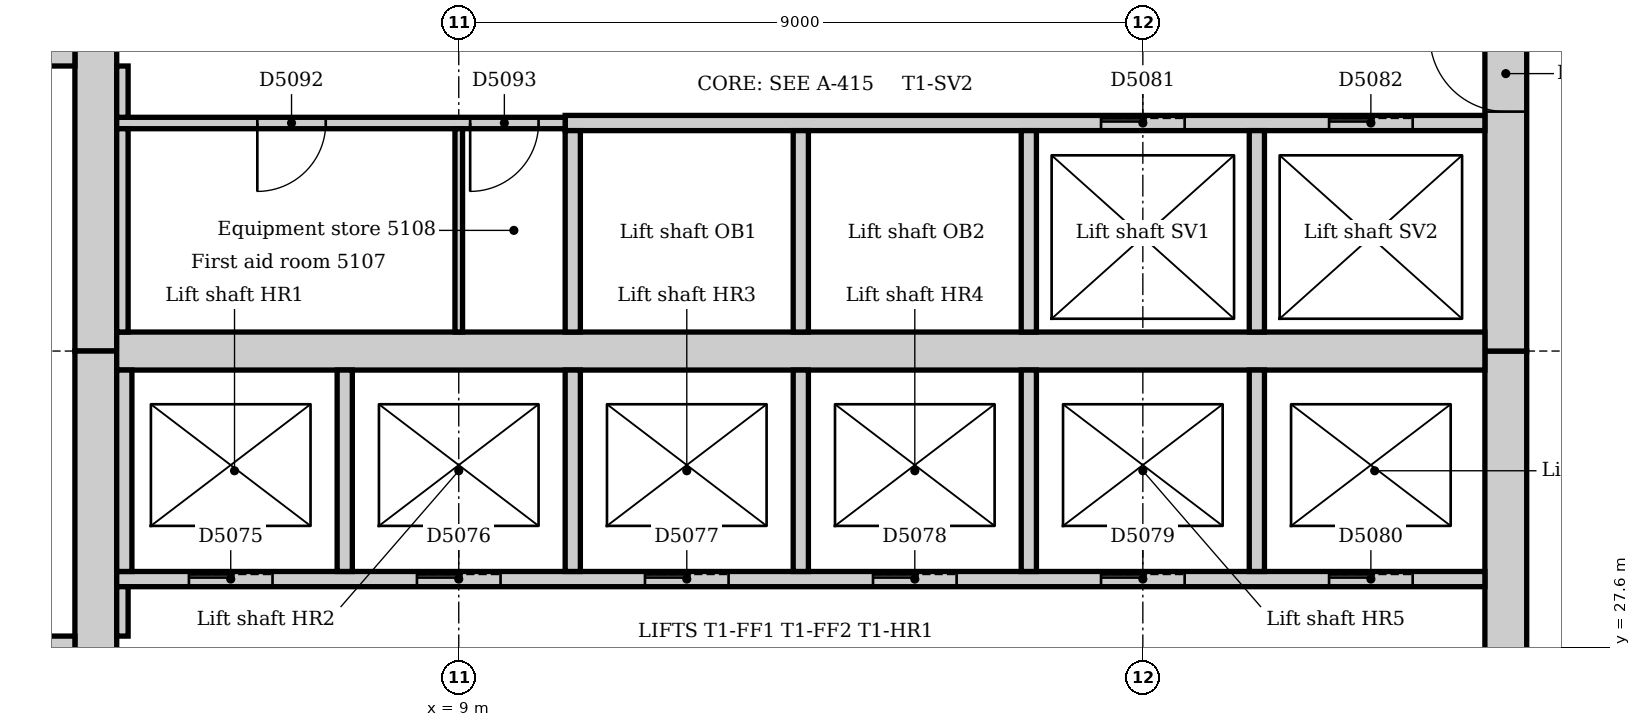
"""IFC4 building model, lengths in metres.
Left out: names, types, materials, properties, quantities, classifications, styles, units other than length and angle.
Written with IfcOpenShell. Run it as: python <this file> out.ifc"""

import sys

from ifc_helpers import new_model, si_unit, direction, frame, frame_2d, origin, place, context, subcontext, project, spatial, rectangle, extrude, element, fill, save


model = new_model("IFC4")
c1 = context("Model", 3, precision=1e-05, world=origin(), true_north=direction((0.0, 1.0)))
c2 = subcontext(c1, "Body", "Model", "MODEL_VIEW")
j1 = project(units=[si_unit("LENGTHUNIT", "METRE"), si_unit("PLANEANGLEUNIT", "RADIAN")], contexts=[c1])
p1 = place(None, origin())
s1 = spatial("IfcSite", under=j1, at=p1, CompositionType="ELEMENT")
p2 = place(p1, origin())
s2 = spatial("IfcBuilding", under=s1, at=p2, CompositionType="ELEMENT")
p3 = place(p2, frame((0.0, 0.0, 214.0)))
s3 = spatial("IfcBuildingStorey", under=s2, at=p3, CompositionType="ELEMENT", Elevation=214.0)
p4 = place(p3, frame((22.775, 21.0, 0.0), z_axis=(0.0, 0.0, 1.0), x_axis=(0.0, 1.0, 0.0)))
e1 = element("IfcWall", 1, at=p4, inside=s3, PredefinedType="SOLIDWALL", context=c2, shape_type="SweptSolid", body=[
    extrude(rectangle(XDim=10.5, YDim=0.55, at=frame_2d((5.25, 0.0))), origin(), (0.0, 0.0, 1.0), 4.0),
])
p5 = place(p4, frame((4.35, 0.0, 0.0)))
e2 = element("IfcOpeningElement", 2, at=p5, cuts=e1, PredefinedType="OPENING", context=c2, shape_type="SweptSolid", body=[
    extrude(rectangle(XDim=1.8, YDim=2.1, at=frame_2d((0.9, 1.05))), frame((0.0, 0.285, 0.0), z_axis=(0.0, -1.0, 0.0), x_axis=(1.0, 0.0, 0.0)), (0.0, 0.0, 1.0), 0.57),
])
p6 = place(p3, frame((22.775, 31.5, 0.0), z_axis=(0.0, 0.0, 1.0), x_axis=(0.0, 1.0, 0.0)))
e3 = element("IfcWall", 3, at=p6, inside=s3, PredefinedType="SOLIDWALL", context=c2, shape_type="SweptSolid", body=[
    extrude(rectangle(XDim=10.5, YDim=0.55, at=frame_2d((5.25, 0.0))), origin(), (0.0, 0.0, 1.0), 4.0),
])
p7 = place(p6, frame((3.15, 0.0, 0.0)))
e4 = element("IfcOpeningElement", 4, at=p7, cuts=e3, PredefinedType="OPENING", context=c2, shape_type="SweptSolid", body=[
    extrude(rectangle(XDim=1.0, YDim=2.1, at=frame_2d((0.5, 1.05))), frame((0.0, 0.285, 0.0), z_axis=(0.0, -1.0, 0.0), x_axis=(1.0, 0.0, 0.0)), (0.0, 0.0, 1.0), 0.57),
])
p8 = place(p6, frame((5.2, 0.0, 0.0)))
e5 = element("IfcOpeningElement", 5, at=p8, cuts=e3, PredefinedType="OPENING", context=c2, shape_type="SweptSolid", body=[
    extrude(rectangle(XDim=1.0, YDim=2.1, at=frame_2d((0.5, 1.05))), frame((0.0, 0.285, 0.0), z_axis=(0.0, -1.0, 0.0), x_axis=(1.0, 0.0, 0.0)), (0.0, 0.0, 1.0), 0.57),
])
p9 = place(p3, frame((4.225, 42.0, 0.0), z_axis=(0.0, 0.0, 1.0), x_axis=(0.0, -1.0, 0.0)))
e6 = element("IfcWall", 6, at=p9, inside=s3, PredefinedType="SOLIDWALL", context=c2, shape_type="SweptSolid", body=[
    extrude(rectangle(XDim=10.5, YDim=0.55, at=frame_2d((5.25, 0.0))), origin(), (0.0, 0.0, 1.0), 4.0),
])
p10 = place(p9, frame((5.3, 0.0, 0.0)))
e7 = element("IfcOpeningElement", 7, at=p10, cuts=e6, PredefinedType="OPENING", context=c2, shape_type="SweptSolid", body=[
    extrude(rectangle(XDim=1.0, YDim=2.1, at=frame_2d((0.5, 1.05))), frame((0.0, 0.285, 0.0), z_axis=(0.0, -1.0, 0.0), x_axis=(1.0, 0.0, 0.0)), (0.0, 0.0, 1.0), 0.57),
])
p11 = place(p3, frame((4.225, 31.5, 0.0), z_axis=(0.0, 0.0, 1.0), x_axis=(0.0, -1.0, 0.0)))
e8 = element("IfcWall", 8, at=p11, inside=s3, PredefinedType="SOLIDWALL", context=c2, shape_type="SweptSolid", body=[
    extrude(rectangle(XDim=10.5, YDim=0.55, at=frame_2d((5.25, 0.0))), origin(), (0.0, 0.0, 1.0), 4.0),
])
p12 = place(p11, frame((4.25, 0.0, 0.0)))
e9 = element("IfcOpeningElement", 9, at=p12, cuts=e8, PredefinedType="OPENING", context=c2, shape_type="SweptSolid", body=[
    extrude(rectangle(XDim=1.0, YDim=2.1, at=frame_2d((0.5, 1.05))), frame((0.0, 0.285, 0.0), z_axis=(0.0, -1.0, 0.0), x_axis=(1.0, 0.0, 0.0)), (0.0, 0.0, 1.0), 0.57),
])
p13 = place(p3, frame((4.5, 31.5, 0.0), z_axis=(0.0, 0.0, 1.0), x_axis=(1.0, 0.0, 0.0)))
e10 = element("IfcWall", 10, at=p13, inside=s3, PredefinedType="SOLIDWALL", context=c2, shape_type="SweptSolid", body=[
    extrude(rectangle(XDim=18.0, YDim=0.5, at=frame_2d((9.0, 0.0))), origin(), (0.0, 0.0, 1.0), 4.0),
])
p14 = place(p3, frame((3.95, 27.625, 0.0), z_axis=(0.0, 0.0, 1.0), x_axis=(-1.0, 0.0, 0.0)))
e11 = element("IfcWall", 11, at=p14, inside=s3, PredefinedType="SOLIDWALL", context=c2, shape_type="SweptSolid", body=[
    extrude(rectangle(XDim=3.59, YDim=0.25, at=frame_2d((1.795, 0.0))), origin(), (0.0, 0.0, 1.0), 4.0),
])
p15 = place(p14, frame((0.45, 0.0, 0.0)))
e12 = element("IfcOpeningElement", 12, at=p15, cuts=e11, PredefinedType="OPENING", context=c2, shape_type="SweptSolid", body=[
    extrude(rectangle(XDim=1.0, YDim=2.1, at=frame_2d((0.5, 1.05))), frame((0.0, 0.135, 0.0), z_axis=(0.0, -1.0, 0.0), x_axis=(1.0, 0.0, 0.0)), (0.0, 0.0, 1.0), 0.27),
])
p16 = place(p3, frame((0.36, 35.375, 0.0), z_axis=(0.0, 0.0, 1.0), x_axis=(1.0, 0.0, 0.0)))
e13 = element("IfcWall", 13, at=p16, inside=s3, PredefinedType="SOLIDWALL", context=c2, shape_type="SweptSolid", body=[
    extrude(rectangle(XDim=3.59, YDim=0.25, at=frame_2d((1.795, 0.0))), origin(), (0.0, 0.0, 1.0), 4.0),
])
p17 = place(p16, frame((2.14, 0.0, 0.0)))
e14 = element("IfcOpeningElement", 14, at=p17, cuts=e13, PredefinedType="OPENING", context=c2, shape_type="SweptSolid", body=[
    extrude(rectangle(XDim=1.0, YDim=2.1, at=frame_2d((0.5, 1.05))), frame((0.0, 0.135, 0.0), z_axis=(0.0, -1.0, 0.0), x_axis=(1.0, 0.0, 0.0)), (0.0, 0.0, 1.0), 0.27),
])
p18 = place(p3, frame((4.5, 28.5, 0.0), z_axis=(0.0, 0.0, 1.0), x_axis=(1.0, 0.0, 0.0)))
e15 = element("IfcWall", 15, at=p18, inside=s3, PredefinedType="PARTITIONING", context=c2, shape_type="SweptSolid", body=[
    extrude(rectangle(XDim=18.0, YDim=0.2, at=frame_2d((9.0, 0.0))), origin(), (0.0, 0.0, 1.0), 3.85),
])
p19 = place(p18, frame((0.95, 0.0, 0.0)))
e16 = element("IfcOpeningElement", 16, at=p19, cuts=e15, PredefinedType="OPENING", context=c2, shape_type="SweptSolid", body=[
    extrude(rectangle(XDim=1.1, YDim=2.1, at=frame_2d((0.55, 1.05))), frame((0.0, 0.11, 0.0), z_axis=(0.0, -1.0, 0.0), x_axis=(1.0, 0.0, 0.0)), (0.0, 0.0, 1.0), 0.22),
])
p20 = place(p18, frame((3.95, 0.0, 0.0)))
e17 = element("IfcOpeningElement", 17, at=p20, cuts=e15, PredefinedType="OPENING", context=c2, shape_type="SweptSolid", body=[
    extrude(rectangle(XDim=1.1, YDim=2.1, at=frame_2d((0.55, 1.05))), frame((0.0, 0.11, 0.0), z_axis=(0.0, -1.0, 0.0), x_axis=(1.0, 0.0, 0.0)), (0.0, 0.0, 1.0), 0.22),
])
p21 = place(p18, frame((6.95, 0.0, 0.0)))
e18 = element("IfcOpeningElement", 18, at=p21, cuts=e15, PredefinedType="OPENING", context=c2, shape_type="SweptSolid", body=[
    extrude(rectangle(XDim=1.1, YDim=2.1, at=frame_2d((0.55, 1.05))), frame((0.0, 0.11, 0.0), z_axis=(0.0, -1.0, 0.0), x_axis=(1.0, 0.0, 0.0)), (0.0, 0.0, 1.0), 0.22),
])
p22 = place(p18, frame((9.95, 0.0, 0.0)))
e19 = element("IfcOpeningElement", 19, at=p22, cuts=e15, PredefinedType="OPENING", context=c2, shape_type="SweptSolid", body=[
    extrude(rectangle(XDim=1.1, YDim=2.1, at=frame_2d((0.55, 1.05))), frame((0.0, 0.11, 0.0), z_axis=(0.0, -1.0, 0.0), x_axis=(1.0, 0.0, 0.0)), (0.0, 0.0, 1.0), 0.22),
])
p23 = place(p18, frame((12.95, 0.0, 0.0)))
e20 = element("IfcOpeningElement", 20, at=p23, cuts=e15, PredefinedType="OPENING", context=c2, shape_type="SweptSolid", body=[
    extrude(rectangle(XDim=1.1, YDim=2.1, at=frame_2d((0.55, 1.05))), frame((0.0, 0.11, 0.0), z_axis=(0.0, -1.0, 0.0), x_axis=(1.0, 0.0, 0.0)), (0.0, 0.0, 1.0), 0.22),
])
p24 = place(p18, frame((15.95, 0.0, 0.0)))
e21 = element("IfcOpeningElement", 21, at=p24, cuts=e15, PredefinedType="OPENING", context=c2, shape_type="SweptSolid", body=[
    extrude(rectangle(XDim=1.1, YDim=2.1, at=frame_2d((0.55, 1.05))), frame((0.0, 0.11, 0.0), z_axis=(0.0, -1.0, 0.0), x_axis=(1.0, 0.0, 0.0)), (0.0, 0.0, 1.0), 0.22),
])
p25 = place(p3, frame((10.4, 34.5, 0.0), z_axis=(0.0, 0.0, 1.0), x_axis=(1.0, 0.0, 0.0)))
e22 = element("IfcWall", 22, at=p25, inside=s3, PredefinedType="PARTITIONING", context=c2, shape_type="SweptSolid", body=[
    extrude(rectangle(XDim=12.1, YDim=0.2, at=frame_2d((6.05, 0.0))), origin(), (0.0, 0.0, 1.0), 3.85),
])
p26 = place(p25, frame((7.05, 0.0, 0.0)))
e23 = element("IfcOpeningElement", 23, at=p26, cuts=e22, PredefinedType="OPENING", context=c2, shape_type="SweptSolid", body=[
    extrude(rectangle(XDim=1.1, YDim=2.1, at=frame_2d((0.55, 1.05))), frame((0.0, 0.11, 0.0), z_axis=(0.0, -1.0, 0.0), x_axis=(1.0, 0.0, 0.0)), (0.0, 0.0, 1.0), 0.22),
])
p27 = place(p25, frame((10.05, 0.0, 0.0)))
e24 = element("IfcOpeningElement", 24, at=p27, cuts=e22, PredefinedType="OPENING", context=c2, shape_type="SweptSolid", body=[
    extrude(rectangle(XDim=1.1, YDim=2.1, at=frame_2d((0.55, 1.05))), frame((0.0, 0.11, 0.0), z_axis=(0.0, -1.0, 0.0), x_axis=(1.0, 0.0, 0.0)), (0.0, 0.0, 1.0), 0.22),
])
for number, where, z_axis, x_axis in (
    (25, (10.5, 28.6, 0.0), (0.0, 0.0, 1.0), (0.0, 1.0, 0.0)),
    (26, (10.5, 31.75, 0.0), (0.0, 0.0, 1.0), (0.0, 1.0, 0.0)),
    (27, (13.5, 28.6, 0.0), (0.0, 0.0, 1.0), (0.0, 1.0, 0.0)),
    (28, (13.5, 31.75, 0.0), (0.0, 0.0, 1.0), (0.0, 1.0, 0.0)),
    (29, (16.5, 28.6, 0.0), (0.0, 0.0, 1.0), (0.0, 1.0, 0.0)),
    (30, (16.5, 31.75, 0.0), (0.0, 0.0, 1.0), (0.0, 1.0, 0.0)),
    (31, (19.5, 28.6, 0.0), (0.0, 0.0, 1.0), (0.0, 1.0, 0.0)),
    (32, (19.5, 31.75, 0.0), (0.0, 0.0, 1.0), (0.0, 1.0, 0.0)),
    (33, (4.6, 28.6, 0.0), (0.0, 0.0, 1.0), (0.0, 1.0, 0.0)),
    (34, (7.5, 28.6, 0.0), (0.0, 0.0, 1.0), (0.0, 1.0, 0.0)),
):
    element("IfcWall", number, at=place(p3, frame(where, z_axis=z_axis, x_axis=x_axis)), inside=s3, PredefinedType="PARTITIONING", context=c2, shape_type="SweptSolid", body=[
        extrude(rectangle(XDim=2.65, YDim=0.2, at=frame_2d((1.325, 0.0))), origin(), (0.0, 0.0, 1.0), 3.85),
    ])
p28 = place(p3, frame((4.5, 34.5, 0.0), z_axis=(0.0, 0.0, 1.0), x_axis=(1.0, 0.0, 0.0)))
e35 = element("IfcWall", 35, at=p28, inside=s3, PredefinedType="PARTITIONING", context=c2, shape_type="SweptSolid", body=[
    extrude(rectangle(XDim=5.9, YDim=0.15, at=frame_2d((2.95, 0.0))), origin(), (0.0, 0.0, 1.0), 3.85),
])
p29 = place(p28, frame((1.85, 0.0, 0.0)))
e36 = element("IfcOpeningElement", 36, at=p29, cuts=e35, PredefinedType="OPENING", context=c2, shape_type="SweptSolid", body=[
    extrude(rectangle(XDim=0.9, YDim=2.1, at=frame_2d((0.45, 1.05))), frame((0.0, 0.085, 0.0), z_axis=(0.0, -1.0, 0.0), x_axis=(1.0, 0.0, 0.0)), (0.0, 0.0, 1.0), 0.17),
])
p30 = place(p28, frame((4.65, 0.0, 0.0)))
e37 = element("IfcOpeningElement", 37, at=p30, cuts=e35, PredefinedType="OPENING", context=c2, shape_type="SweptSolid", body=[
    extrude(rectangle(XDim=0.9, YDim=2.1, at=frame_2d((0.45, 1.05))), frame((0.0, 0.085, 0.0), z_axis=(0.0, -1.0, 0.0), x_axis=(1.0, 0.0, 0.0)), (0.0, 0.0, 1.0), 0.17),
])
p31 = place(p3, frame((4.575, 34.575, 0.0), z_axis=(0.0, 0.0, 1.0), x_axis=(0.0, 1.0, 0.0)))
e38 = element("IfcWall", 38, at=p31, inside=s3, PredefinedType="PARTITIONING", context=c2, shape_type="SweptSolid", body=[
    extrude(rectangle(XDim=0.675, YDim=0.15, at=frame_2d((0.338, 0.0))), origin(), (0.0, 0.0, 1.0), 3.85),
])
p32 = place(p3, frame((4.575, 31.75, 0.0), z_axis=(0.0, 0.0, 1.0), x_axis=(0.0, 1.0, 0.0)))
e39 = element("IfcWall", 39, at=p32, inside=s3, PredefinedType="PARTITIONING", context=c2, shape_type="SweptSolid", body=[
    extrude(rectangle(XDim=2.675, YDim=0.15, at=frame_2d((1.337, 0.0))), origin(), (0.0, 0.0, 1.0), 3.85),
])
p33 = place(p3, frame((4.575, 27.75, 0.0), z_axis=(0.0, 0.0, 1.0), x_axis=(0.0, 1.0, 0.0)))
e40 = element("IfcWall", 40, at=p33, inside=s3, PredefinedType="PARTITIONING", context=c2, shape_type="SweptSolid", body=[
    extrude(rectangle(XDim=0.65, YDim=0.15, at=frame_2d((0.325, 0.0))), origin(), (0.0, 0.0, 1.0), 3.85),
])
p34 = place(p3, frame((9.0, 31.75, 0.0), z_axis=(0.0, 0.0, 1.0), x_axis=(0.0, 1.0, 0.0)))
e41 = element("IfcWall", 41, at=p34, inside=s3, PredefinedType="PARTITIONING", context=c2, shape_type="SweptSolid", body=[
    extrude(rectangle(XDim=2.675, YDim=0.1, at=frame_2d((1.337, 0.0))), origin(), (0.0, 0.0, 1.0), 3.85),
])
p35 = place(p19, origin())
e42 = element("IfcDoor", 42, at=p35, inside=s3, OperationType="SLIDING_TO_LEFT", PredefinedType="DOOR", context=c2, shape_type="SweptSolid", body=[
    extrude(rectangle(XDim=1.1, YDim=2.1, at=frame_2d((0.55, 1.05))), frame((0.0, 0.025, 0.0), z_axis=(0.0, -1.0, 0.0), x_axis=(1.0, 0.0, 0.0)), (0.0, 0.0, 1.0), 0.05),
])
fill(e16, e42)
p36 = place(p20, origin())
e43 = element("IfcDoor", 43, at=p36, inside=s3, OperationType="SLIDING_TO_LEFT", PredefinedType="DOOR", context=c2, shape_type="SweptSolid", body=[
    extrude(rectangle(XDim=1.1, YDim=2.1, at=frame_2d((0.55, 1.05))), frame((0.0, 0.025, 0.0), z_axis=(0.0, -1.0, 0.0), x_axis=(1.0, 0.0, 0.0)), (0.0, 0.0, 1.0), 0.05),
])
fill(e17, e43)
p37 = place(p21, origin())
e44 = element("IfcDoor", 44, at=p37, inside=s3, OperationType="SLIDING_TO_LEFT", PredefinedType="DOOR", context=c2, shape_type="SweptSolid", body=[
    extrude(rectangle(XDim=1.1, YDim=2.1, at=frame_2d((0.55, 1.05))), frame((0.0, 0.025, 0.0), z_axis=(0.0, -1.0, 0.0), x_axis=(1.0, 0.0, 0.0)), (0.0, 0.0, 1.0), 0.05),
])
fill(e18, e44)
p38 = place(p22, origin())
e45 = element("IfcDoor", 45, at=p38, inside=s3, OperationType="SLIDING_TO_LEFT", PredefinedType="DOOR", context=c2, shape_type="SweptSolid", body=[
    extrude(rectangle(XDim=1.1, YDim=2.1, at=frame_2d((0.55, 1.05))), frame((0.0, 0.025, 0.0), z_axis=(0.0, -1.0, 0.0), x_axis=(1.0, 0.0, 0.0)), (0.0, 0.0, 1.0), 0.05),
])
fill(e19, e45)
p39 = place(p23, origin())
e46 = element("IfcDoor", 46, at=p39, inside=s3, OperationType="SLIDING_TO_LEFT", PredefinedType="DOOR", context=c2, shape_type="SweptSolid", body=[
    extrude(rectangle(XDim=1.1, YDim=2.1, at=frame_2d((0.55, 1.05))), frame((0.0, 0.025, 0.0), z_axis=(0.0, -1.0, 0.0), x_axis=(1.0, 0.0, 0.0)), (0.0, 0.0, 1.0), 0.05),
])
fill(e20, e46)
p40 = place(p24, origin())
e47 = element("IfcDoor", 47, at=p40, inside=s3, OperationType="SLIDING_TO_LEFT", PredefinedType="DOOR", context=c2, shape_type="SweptSolid", body=[
    extrude(rectangle(XDim=1.1, YDim=2.1, at=frame_2d((0.55, 1.05))), frame((0.0, 0.025, 0.0), z_axis=(0.0, -1.0, 0.0), x_axis=(1.0, 0.0, 0.0)), (0.0, 0.0, 1.0), 0.05),
])
fill(e21, e47)
p41 = place(p26, origin())
e48 = element("IfcDoor", 48, at=p41, inside=s3, OperationType="SLIDING_TO_LEFT", PredefinedType="DOOR", context=c2, shape_type="SweptSolid", body=[
    extrude(rectangle(XDim=1.1, YDim=2.1, at=frame_2d((0.55, 1.05))), frame((0.0, 0.025, 0.0), z_axis=(0.0, -1.0, 0.0), x_axis=(1.0, 0.0, 0.0)), (0.0, 0.0, 1.0), 0.05),
])
fill(e23, e48)
p42 = place(p27, origin())
e49 = element("IfcDoor", 49, at=p42, inside=s3, OperationType="SLIDING_TO_LEFT", PredefinedType="DOOR", context=c2, shape_type="SweptSolid", body=[
    extrude(rectangle(XDim=1.1, YDim=2.1, at=frame_2d((0.55, 1.05))), frame((0.0, 0.025, 0.0), z_axis=(0.0, -1.0, 0.0), x_axis=(1.0, 0.0, 0.0)), (0.0, 0.0, 1.0), 0.05),
])
fill(e24, e49)
p43 = place(p7, origin())
e50 = element("IfcDoor", 50, at=p43, inside=s3, OperationType="SINGLE_SWING_RIGHT", PredefinedType="DOOR", context=c2, shape_type="SweptSolid", body=[
    extrude(rectangle(XDim=1.0, YDim=2.1, at=frame_2d((0.5, 1.05))), frame((0.0, 0.025, 0.0), z_axis=(0.0, -1.0, 0.0), x_axis=(1.0, 0.0, 0.0)), (0.0, 0.0, 1.0), 0.05),
])
fill(e4, e50)
p44 = place(p29, frame((0.9, 0.0, 0.0), z_axis=(0.0, 0.0, 1.0), x_axis=(-1.0, 0.0, 0.0)))
e51 = element("IfcDoor", 51, at=p44, inside=s3, OperationType="SINGLE_SWING_RIGHT", PredefinedType="DOOR", context=c2, shape_type="SweptSolid", body=[
    extrude(rectangle(XDim=0.9, YDim=2.1, at=frame_2d((0.45, 1.05))), frame((0.0, 0.025, 0.0), z_axis=(0.0, -1.0, 0.0), x_axis=(1.0, 0.0, 0.0)), (0.0, 0.0, 1.0), 0.05),
])
fill(e36, e51)
p45 = place(p30, frame((0.9, 0.0, 0.0), z_axis=(0.0, 0.0, 1.0), x_axis=(-1.0, 0.0, 0.0)))
e52 = element("IfcDoor", 52, at=p45, inside=s3, OperationType="SINGLE_SWING_RIGHT", PredefinedType="DOOR", context=c2, shape_type="SweptSolid", body=[
    extrude(rectangle(XDim=0.9, YDim=2.1, at=frame_2d((0.45, 1.05))), frame((0.0, 0.025, 0.0), z_axis=(0.0, -1.0, 0.0), x_axis=(1.0, 0.0, 0.0)), (0.0, 0.0, 1.0), 0.05),
])
fill(e37, e52)
save(model, sys.argv[1])
